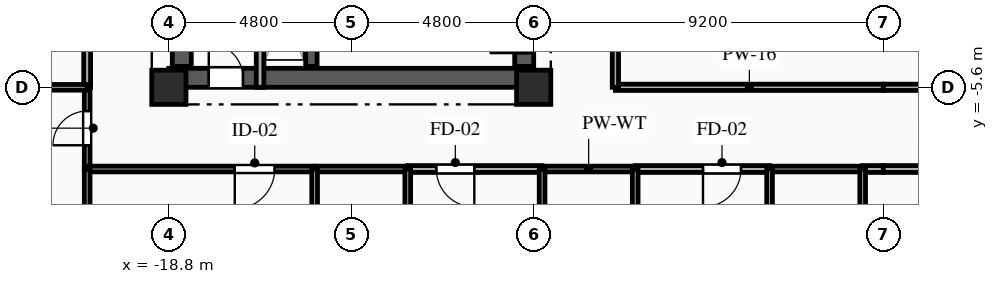
"""IFC4 building model, lengths in metres.
Left out: names, types, materials, properties, quantities, classifications, styles, units other than length and angle.
Written with IfcOpenShell. Run it as: python <this file> out.ifc"""

import sys

from ifc_helpers import new_model, si_unit, direction, frame, frame_2d, origin, origin_2d, place, context, subcontext, project, spatial, rectangle, extrude, element, fill, save


model = new_model("IFC4")
c1 = context("Model", 3, precision=1e-05, world=origin(), true_north=direction((0.0, 1.0)))
c2 = subcontext(c1, "Body", "Model", "MODEL_VIEW")
j1 = project(units=[si_unit("LENGTHUNIT", "METRE"), si_unit("PLANEANGLEUNIT", "RADIAN")], contexts=[c1])
p1 = place(None, origin())
s1 = spatial("IfcSite", under=j1, at=p1, CompositionType="ELEMENT")
p2 = place(p1, origin())
s2 = spatial("IfcBuilding", under=s1, at=p2, CompositionType="ELEMENT")
p3 = place(p2, frame((0.0, 0.0, 151.1)))
s3 = spatial("IfcBuildingStorey", under=s2, at=p3, CompositionType="ELEMENT", Elevation=151.1)
for number, where, z_axis, x_axis in (
    (1, (-18.8, -5.6, 0.0), (0.0, 0.0, 1.0), (1.0, 0.0, 0.0)),
    (2, (-9.2, -5.6, 0.0), (0.0, 0.0, 1.0), (1.0, 0.0, 0.0)),
):
    element("IfcColumn", number, at=place(p3, frame(where, z_axis=z_axis, x_axis=x_axis)), inside=s3, PredefinedType="COLUMN", context=c2, shape_type="SweptSolid", body=[
        extrude(rectangle(XDim=0.9, YDim=0.9, at=origin_2d()), origin(), (0.0, 0.0, 1.0), 3.35),
    ])
p4 = place(p3, frame((-18.8, -5.35, 0.0), z_axis=(0.0, 0.0, 1.0), x_axis=(1.0, 0.0, 0.0)))
e3 = element("IfcWall", 3, at=p4, inside=s3, PredefinedType="SHEAR", context=c2, shape_type="SweptSolid", body=[
    extrude(rectangle(XDim=9.6, YDim=0.5, at=frame_2d((4.8, 0.0))), origin(), (0.0, 0.0, 1.0), 3.04),
])
p5 = place(p4, frame((1.05, 0.0, 0.0)))
e4 = element("IfcOpeningElement", 4, at=p5, cuts=e3, PredefinedType="OPENING", context=c2, shape_type="SweptSolid", body=[
    extrude(rectangle(XDim=0.9, YDim=2.1, at=frame_2d((0.45, 1.05))), frame((0.0, 0.26, 0.0), z_axis=(0.0, -1.0, 0.0), x_axis=(1.0, 0.0, 0.0)), (0.0, 0.0, 1.0), 0.52),
])
p6 = place(p3, frame((-18.46, -5.05, 0.0), z_axis=(0.0, 0.0, 1.0), x_axis=(0.0, 1.0, 0.0)))
e5 = element("IfcWall", 5, at=p6, inside=s3, PredefinedType="SHEAR", context=c2, shape_type="SweptSolid", body=[
    extrude(rectangle(XDim=10.1, YDim=0.5, at=frame_2d((5.05, 0.0))), origin(), (0.0, 0.0, 1.0), 3.04),
])
p7 = place(p3, frame((-9.45, -5.05, 0.0), z_axis=(0.0, 0.0, 1.0), x_axis=(0.0, 1.0, 0.0)))
e6 = element("IfcWall", 6, at=p7, inside=s3, PredefinedType="SHEAR", context=c2, shape_type="SweptSolid", body=[
    extrude(rectangle(XDim=10.1, YDim=0.5, at=frame_2d((5.05, 0.0))), origin(), (0.0, 0.0, 1.0), 3.04),
])
p8 = place(p7, frame((7.15, 0.0, 0.0)))
e7 = element("IfcOpeningElement", 7, at=p8, cuts=e6, PredefinedType="OPENING", context=c2, shape_type="SweptSolid", body=[
    extrude(rectangle(XDim=0.9, YDim=2.1, at=frame_2d((0.45, 1.05))), frame((0.0, 0.26, 0.0), z_axis=(0.0, -1.0, 0.0), x_axis=(1.0, 0.0, 0.0)), (0.0, 0.0, 1.0), 0.52),
])
p9 = place(p7, frame((2.4, 0.0, 0.0)))
e8 = element("IfcOpeningElement", 8, at=p9, cuts=e6, PredefinedType="OPENING", context=c2, shape_type="SweptSolid", body=[
    extrude(rectangle(XDim=1.2, YDim=2.15, at=frame_2d((0.6, 1.075))), frame((0.0, 0.26, 0.0), z_axis=(0.0, -1.0, 0.0), x_axis=(1.0, 0.0, 0.0)), (0.0, 0.0, 1.0), 0.52),
])
p10 = place(p7, frame((0.35, 0.0, 0.0)))
e9 = element("IfcOpeningElement", 9, at=p10, cuts=e6, PredefinedType="OPENING", context=c2, shape_type="SweptSolid", body=[
    extrude(rectangle(XDim=0.9, YDim=2.1, at=frame_2d((0.45, 1.05))), frame((0.0, 0.26, 0.0), z_axis=(0.0, -1.0, 0.0), x_axis=(1.0, 0.0, 0.0)), (0.0, 0.0, 1.0), 0.52),
])
p11 = place(p7, frame((5.0, 0.0, 0.0)))
e10 = element("IfcOpeningElement", 10, at=p11, cuts=e6, PredefinedType="OPENING", context=c2, shape_type="SweptSolid", body=[
    extrude(rectangle(XDim=0.9, YDim=2.1, at=frame_2d((0.45, 1.05))), frame((0.0, 0.26, 0.0), z_axis=(0.0, -1.0, 0.0), x_axis=(1.0, 0.0, 0.0)), (0.0, 0.0, 1.0), 0.52),
])
p12 = place(p3, frame((-15.05, -5.05, 0.0), z_axis=(0.0, 0.0, 1.0), x_axis=(0.0, 1.0, 0.0)))
e11 = element("IfcWall", 11, at=p12, inside=s3, PredefinedType="SHEAR", context=c2, shape_type="SweptSolid", body=[
    extrude(rectangle(XDim=10.1, YDim=0.3, at=frame_2d((5.05, 0.0))), origin(), (0.0, 0.0, 1.0), 3.04),
])
p13 = place(p3, frame((-16.4, -5.6, 0.0), z_axis=(0.0, 0.0, 1.0), x_axis=(0.0, 1.0, 0.0)))
e12 = element("IfcWall", 12, at=p13, inside=s3, PredefinedType="PARTITIONING", context=c2, shape_type="SweptSolid", body=[
    extrude(rectangle(XDim=3.49, YDim=0.2, at=frame_2d((1.745, 0.0))), origin(), (0.0, 0.0, 1.0), 3.04),
])
p14 = place(p3, frame((-20.95, -7.75, 0.0), z_axis=(0.0, 0.0, 1.0), x_axis=(0.0, 1.0, 0.0)))
e13 = element("IfcWall", 13, at=p14, inside=s3, PredefinedType="PARTITIONING", context=c2, shape_type="SweptSolid", body=[
    extrude(rectangle(XDim=2.15, YDim=0.15, at=frame_2d((1.075, 0.0))), origin(), (0.0, 0.0, 1.0), 3.04),
])
p15 = place(p14, frame((0.625, 0.0, 0.0)))
e14 = element("IfcOpeningElement", 14, at=p15, cuts=e13, PredefinedType="OPENING", context=c2, shape_type="SweptSolid", body=[
    extrude(rectangle(XDim=0.9, YDim=2.1, at=frame_2d((0.45, 1.05))), frame((0.0, 0.085, 0.0), z_axis=(0.0, -1.0, 0.0), x_axis=(1.0, 0.0, 0.0)), (0.0, 0.0, 1.0), 0.17),
])
p16 = place(p3, frame((-14.964, -7.75, 0.0), z_axis=(0.0, 0.0, 1.0), x_axis=(-1.0, 0.0, 0.0)))
e15 = element("IfcWall", 15, at=p16, inside=s3, PredefinedType="PARTITIONING", context=c2, shape_type="SweptSolid", body=[
    extrude(rectangle(XDim=5.986, YDim=0.15, at=frame_2d((2.993, 0.0))), origin(), (0.0, 0.0, 1.0), 3.04),
])
p17 = place(p16, frame((1.052, 0.0, 0.0)))
e16 = element("IfcOpeningElement", 16, at=p17, cuts=e15, PredefinedType="OPENING", context=c2, shape_type="SweptSolid", body=[
    extrude(rectangle(XDim=1.05, YDim=2.15, at=frame_2d((0.525, 1.075))), frame((0.0, 0.085, 0.0), z_axis=(0.0, -1.0, 0.0), x_axis=(1.0, 0.0, 0.0)), (0.0, 0.0, 1.0), 0.17),
])
p18 = place(p3, frame((-8.979, -7.75, 0.0), z_axis=(0.0, 0.0, 1.0), x_axis=(-1.0, 0.0, 0.0)))
e17 = element("IfcWall", 17, at=p18, inside=s3, PredefinedType="PARTITIONING", context=c2, shape_type="SweptSolid", body=[
    extrude(rectangle(XDim=3.535, YDim=0.18, at=frame_2d((1.768, 0.0))), origin(), (0.0, 0.0, 1.0), 3.04),
])
p19 = place(p18, frame((1.783, 0.0, 0.0)))
e18 = element("IfcOpeningElement", 18, at=p19, cuts=e17, PredefinedType="OPENING", context=c2, shape_type="SweptSolid", body=[
    extrude(rectangle(XDim=1.0, YDim=2.15, at=frame_2d((0.5, 1.075))), frame((0.0, 0.1, 0.0), z_axis=(0.0, -1.0, 0.0), x_axis=(1.0, 0.0, 0.0)), (0.0, 0.0, 1.0), 0.2),
])
p20 = place(p3, frame((-12.514, -7.75, 0.0), z_axis=(0.0, 0.0, 1.0), x_axis=(-1.0, 0.0, 0.0)))
e19 = element("IfcWall", 19, at=p20, inside=s3, PredefinedType="PLUMBINGWALL", context=c2, shape_type="SweptSolid", body=[
    extrude(rectangle(XDim=2.45, YDim=0.15, at=frame_2d((1.225, 0.0))), origin(), (0.0, 0.0, 1.0), 3.04),
])
p21 = place(p3, frame((-2.993, -7.75, 0.0), z_axis=(0.0, 0.0, 1.0), x_axis=(-1.0, 0.0, 0.0)))
e20 = element("IfcWall", 20, at=p21, inside=s3, PredefinedType="PARTITIONING", context=c2, shape_type="SweptSolid", body=[
    extrude(rectangle(XDim=3.536, YDim=0.18, at=frame_2d((1.768, 0.0))), origin(), (0.0, 0.0, 1.0), 3.04),
])
p22 = place(p21, frame((0.752, 0.0, 0.0)))
e21 = element("IfcOpeningElement", 21, at=p22, cuts=e20, PredefinedType="OPENING", context=c2, shape_type="SweptSolid", body=[
    extrude(rectangle(XDim=1.0, YDim=2.15, at=frame_2d((0.5, 1.075))), frame((0.0, 0.1, 0.0), z_axis=(0.0, -1.0, 0.0), x_axis=(1.0, 0.0, 0.0)), (0.0, 0.0, 1.0), 0.2),
])
p23 = place(p3, frame((-6.529, -7.75, 0.0), z_axis=(0.0, 0.0, 1.0), x_axis=(-1.0, 0.0, 0.0)))
e22 = element("IfcWall", 22, at=p23, inside=s3, PredefinedType="PLUMBINGWALL", context=c2, shape_type="SweptSolid", body=[
    extrude(rectangle(XDim=2.45, YDim=0.15, at=frame_2d((1.225, 0.0))), origin(), (0.0, 0.0, 1.0), 3.04),
])
p24 = place(p3, frame((0.0, -7.75, 0.0), z_axis=(0.0, 0.0, 1.0), x_axis=(-1.0, 0.0, 0.0)))
e23 = element("IfcWall", 23, at=p24, inside=s3, PredefinedType="PARTITIONING", context=c2, shape_type="SweptSolid", body=[
    extrude(rectangle(XDim=0.543, YDim=0.18, at=frame_2d((0.271, 0.0))), origin(), (0.0, 0.0, 1.0), 3.04),
])
p25 = place(p3, frame((-0.543, -7.75, 0.0), z_axis=(0.0, 0.0, 1.0), x_axis=(-1.0, 0.0, 0.0)))
e24 = element("IfcWall", 24, at=p25, inside=s3, PredefinedType="PLUMBINGWALL", context=c2, shape_type="SweptSolid", body=[
    extrude(rectangle(XDim=2.45, YDim=0.15, at=frame_2d((1.225, 0.0))), origin(), (0.0, 0.0, 1.0), 3.04),
])
p26 = place(p3, frame((-7.05, -5.6, 0.0), z_axis=(0.0, 0.0, 1.0), x_axis=(1.0, 0.0, 0.0)))
e25 = element("IfcWall", 25, at=p26, inside=s3, PredefinedType="PARTITIONING", context=c2, shape_type="SweptSolid", body=[
    extrude(rectangle(XDim=7.05, YDim=0.165, at=frame_2d((3.525, 0.0))), origin(), (0.0, 0.0, 1.0), 2.525),
])
p27 = place(p3, frame((2.993, -7.75, 0.0), z_axis=(0.0, 0.0, 1.0), x_axis=(-1.0, 0.0, 0.0)))
e26 = element("IfcWall", 26, at=p27, inside=s3, PredefinedType="PARTITIONING", context=c2, shape_type="SweptSolid", body=[
    extrude(rectangle(XDim=2.993, YDim=0.18, at=frame_2d((1.497, 0.0))), origin(), (0.0, 0.0, 1.0), 3.04),
])
p28 = place(p27, frame((0.892, 0.0, 0.0)))
e27 = element("IfcOpeningElement", 27, at=p28, cuts=e26, PredefinedType="OPENING", context=c2, shape_type="SweptSolid", body=[
    extrude(rectangle(XDim=1.0, YDim=2.15, at=frame_2d((0.5, 1.075))), frame((0.0, 0.1, 0.0), z_axis=(0.0, -1.0, 0.0), x_axis=(1.0, 0.0, 0.0)), (0.0, 0.0, 1.0), 0.2),
])
p29 = place(p3, frame((0.0, -5.6, 0.0), z_axis=(0.0, 0.0, 1.0), x_axis=(1.0, 0.0, 0.0)))
e28 = element("IfcWall", 28, at=p29, inside=s3, PredefinedType="PARTITIONING", context=c2, shape_type="SweptSolid", body=[
    extrude(rectangle(XDim=7.05, YDim=0.165, at=frame_2d((3.525, 0.0))), origin(), (0.0, 0.0, 1.0), 2.525),
])
p30 = place(p3, frame((-20.95, -5.6, 0.0), z_axis=(0.0, 0.0, 1.0), x_axis=(0.0, 1.0, 0.0)))
e29 = element("IfcWall", 29, at=p30, inside=s3, PredefinedType="PARTITIONING", context=c2, shape_type="SweptSolid", body=[
    extrude(rectangle(XDim=14.1, YDim=0.18, at=frame_2d((7.05, 0.0))), origin(), (0.0, 0.0, 1.0), 3.04),
])
p31 = place(p30, frame((5.058, 0.0, 0.0)))
e30 = element("IfcOpeningElement", 30, at=p31, cuts=e29, PredefinedType="OPENING", context=c2, shape_type="SweptSolid", body=[
    extrude(rectangle(XDim=1.0, YDim=2.15, at=frame_2d((0.5, 1.075))), frame((0.0, 0.1, 0.0), z_axis=(0.0, -1.0, 0.0), x_axis=(1.0, 0.0, 0.0)), (0.0, 0.0, 1.0), 0.2),
])
p32 = place(p3, frame((-7.05, -2.95, 0.0), z_axis=(0.0, 0.0, 1.0), x_axis=(0.0, -1.0, 0.0)))
e31 = element("IfcWall", 31, at=p32, inside=s3, PredefinedType="PARTITIONING", context=c2, shape_type="SweptSolid", body=[
    extrude(rectangle(XDim=2.65, YDim=0.165, at=frame_2d((1.325, 0.0))), origin(), (0.0, 0.0, 1.0), 3.04),
])
p33 = place(p3, frame((-20.95, -5.6, 0.0), z_axis=(0.0, 0.0, 1.0), x_axis=(-1.0, 0.0, 0.0)))
e32 = element("IfcWall", 32, at=p33, inside=s3, PredefinedType="PARTITIONING", context=c2, shape_type="SweptSolid", body=[
    extrude(rectangle(XDim=2.65, YDim=0.15, at=frame_2d((1.325, 0.0))), origin(), (0.0, 0.0, 1.0), 3.04),
])
p34 = place(p33, frame((0.965, 0.0, 0.0)))
e33 = element("IfcOpeningElement", 33, at=p34, cuts=e32, PredefinedType="OPENING", context=c2, shape_type="SweptSolid", body=[
    extrude(rectangle(XDim=1.05, YDim=2.15, at=frame_2d((0.525, 1.075))), frame((0.0, 0.085, 0.0), z_axis=(0.0, -1.0, 0.0), x_axis=(1.0, 0.0, 0.0)), (0.0, 0.0, 1.0), 0.17),
])
p35 = place(p3, frame((-20.95, -7.75, 0.0), z_axis=(0.0, 0.0, 1.0), x_axis=(0.0, -1.0, 0.0)))
e34 = element("IfcWall", 34, at=p35, inside=s3, PredefinedType="PARTITIONING", context=c2, shape_type="SweptSolid", body=[
    extrude(rectangle(XDim=7.85, YDim=0.15, at=frame_2d((3.925, 0.0))), origin(), (0.0, 0.0, 1.0), 3.04),
])
for number, where, z_axis, x_axis in (
    (35, (-14.964, -7.75, 0.0), (0.0, 0.0, 1.0), (0.0, -1.0, 0.0)),
    (36, (-12.514, -9.9, 0.0), (0.0, 0.0, 1.0), (0.0, 1.0, 0.0)),
):
    element("IfcWall", number, at=place(p3, frame(where, z_axis=z_axis, x_axis=x_axis)), inside=s3, PredefinedType="PLUMBINGWALL", context=c2, shape_type="SweptSolid", body=[
        extrude(rectangle(XDim=2.15, YDim=0.15, at=frame_2d((1.075, 0.0))), origin(), (0.0, 0.0, 1.0), 3.04),
    ])
p36 = place(p3, frame((-8.979, -7.75, 0.0), z_axis=(0.0, 0.0, 1.0), x_axis=(0.0, -1.0, 0.0)))
e37 = element("IfcWall", 37, at=p36, inside=s3, PredefinedType="PLUMBINGWALL", context=c2, shape_type="SweptSolid", body=[
    extrude(rectangle(XDim=2.15, YDim=0.15, at=frame_2d((1.075, 0.0))), origin(), (0.0, 0.0, 1.0), 2.525),
])
for number, where, z_axis, x_axis in (
    (38, (-6.529, -9.9, 0.0), (0.0, 0.0, 1.0), (0.0, 1.0, 0.0)),
    (39, (-2.993, -7.75, 0.0), (0.0, 0.0, 1.0), (0.0, -1.0, 0.0)),
    (40, (-0.543, -9.9, 0.0), (0.0, 0.0, 1.0), (0.0, 1.0, 0.0)),
):
    element("IfcWall", number, at=place(p3, frame(where, z_axis=z_axis, x_axis=x_axis)), inside=s3, PredefinedType="PLUMBINGWALL", context=c2, shape_type="SweptSolid", body=[
        extrude(rectangle(XDim=2.15, YDim=0.15, at=frame_2d((1.075, 0.0))), origin(), (0.0, 0.0, 1.0), 3.04),
    ])
p37 = place(p5, origin())
e41 = element("IfcDoor", 41, at=p37, inside=s3, OperationType="SINGLE_SWING_LEFT", PredefinedType="DOOR", context=c2, shape_type="SweptSolid", body=[
    extrude(rectangle(XDim=0.9, YDim=2.1, at=frame_2d((0.45, 1.05))), frame((0.0, 0.025, 0.0), z_axis=(0.0, -1.0, 0.0), x_axis=(1.0, 0.0, 0.0)), (0.0, 0.0, 1.0), 0.05),
])
fill(e4, e41)
p38 = place(p10, origin())
e42 = element("IfcDoor", 42, at=p38, inside=s3, OperationType="SINGLE_SWING_LEFT", PredefinedType="DOOR", context=c2, shape_type="SweptSolid", body=[
    extrude(rectangle(XDim=0.9, YDim=2.1, at=frame_2d((0.45, 1.05))), frame((0.0, 0.025, 0.0), z_axis=(0.0, -1.0, 0.0), x_axis=(1.0, 0.0, 0.0)), (0.0, 0.0, 1.0), 0.05),
])
fill(e9, e42)
p39 = place(p15, origin())
e43 = element("IfcDoor", 43, at=p39, inside=s3, OperationType="SINGLE_SWING_LEFT", PredefinedType="DOOR", context=c2, shape_type="SweptSolid", body=[
    extrude(rectangle(XDim=0.9, YDim=2.1, at=frame_2d((0.45, 1.05))), frame((0.0, 0.025, 0.0), z_axis=(0.0, -1.0, 0.0), x_axis=(1.0, 0.0, 0.0)), (0.0, 0.0, 1.0), 0.05),
])
fill(e14, e43)
p40 = place(p17, origin())
e44 = element("IfcDoor", 44, at=p40, inside=s3, OperationType="SINGLE_SWING_RIGHT", PredefinedType="DOOR", context=c2, shape_type="SweptSolid", body=[
    extrude(rectangle(XDim=1.05, YDim=2.15, at=frame_2d((0.525, 1.075))), frame((0.0, 0.025, 0.0), z_axis=(0.0, -1.0, 0.0), x_axis=(1.0, 0.0, 0.0)), (0.0, 0.0, 1.0), 0.05),
])
fill(e16, e44)
p41 = place(p19, origin())
e45 = element("IfcDoor", 45, at=p41, inside=s3, OperationType="SINGLE_SWING_LEFT", PredefinedType="DOOR", context=c2, shape_type="SweptSolid", body=[
    extrude(rectangle(XDim=1.0, YDim=2.15, at=frame_2d((0.5, 1.075))), frame((0.0, 0.025, 0.0), z_axis=(0.0, -1.0, 0.0), x_axis=(1.0, 0.0, 0.0)), (0.0, 0.0, 1.0), 0.05),
])
fill(e18, e45)
p42 = place(p22, origin())
e46 = element("IfcDoor", 46, at=p42, inside=s3, OperationType="SINGLE_SWING_RIGHT", PredefinedType="DOOR", context=c2, shape_type="SweptSolid", body=[
    extrude(rectangle(XDim=1.0, YDim=2.15, at=frame_2d((0.5, 1.075))), frame((0.0, 0.025, 0.0), z_axis=(0.0, -1.0, 0.0), x_axis=(1.0, 0.0, 0.0)), (0.0, 0.0, 1.0), 0.05),
])
fill(e21, e46)
save(model, sys.argv[1])
